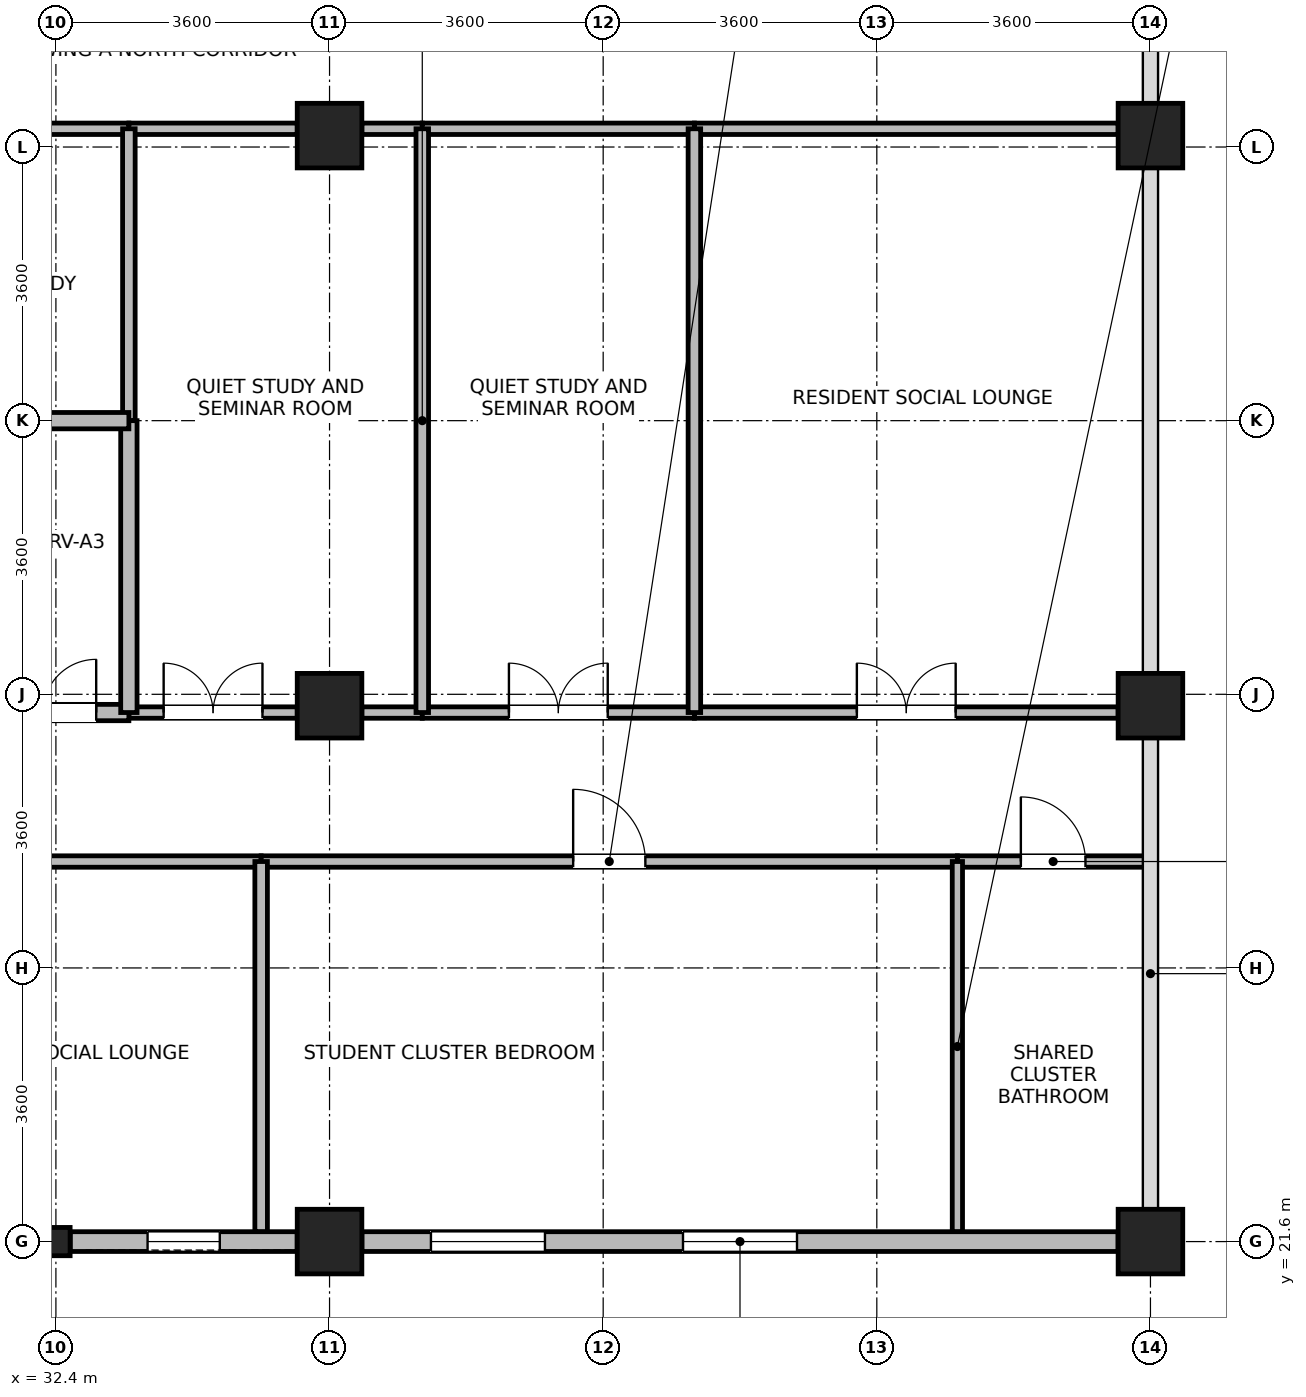
"""IFC4 building model, lengths in metres.
Left out: names, types, materials, properties, quantities, classifications, styles, units other than length and angle.
Written with IfcOpenShell. Run it as: python <this file> out.ifc"""

import sys

from ifc_helpers import new_model, si_unit, direction, frame, frame_2d, origin, origin_2d, place, context, subcontext, project, spatial, rectangle, i_section, extrude, source, transform, mapped, element, fill, save


model = new_model("IFC4")
c1 = context("Model", 3, precision=1e-05, world=origin(), true_north=direction((0.0, 1.0)))
c2 = subcontext(c1, "Body", "Model", "MODEL_VIEW")
j1 = project(units=[si_unit("LENGTHUNIT", "METRE"), si_unit("PLANEANGLEUNIT", "RADIAN")], contexts=[c1])
p1 = place(None, origin())
s1 = spatial("IfcSite", under=j1, at=p1, CompositionType="ELEMENT")
p2 = place(p1, origin())
s2 = spatial("IfcBuilding", under=s1, at=p2, CompositionType="ELEMENT")
p3 = place(p2, frame((0.0, 0.0, 279.5)))
s3 = spatial("IfcBuildingStorey", under=s2, at=p3, CompositionType="ELEMENT", Elevation=279.5)
m1 = source(origin(), c2, "Body", "SweptSolid", [
    extrude(rectangle(XDim=0.85, YDim=0.85, at=origin_2d()), origin(), (0.0, 0.0, 1.0), 3.7),
])
for number, where, z_axis, x_axis in (
    (1, (36.0, 21.6, 0.0), (0.0, 0.0, 1.0), (1.0, 0.0, 0.0)),
    (2, (36.0, 28.65, 0.0), (0.0, 0.0, 1.0), (1.0, 0.0, 0.0)),
    (3, (36.0, 36.15, 0.0), (0.0, 0.0, 1.0), (1.0, 0.0, 0.0)),
    (4, (46.8, 21.6, 0.0), (0.0, 0.0, 1.0), (1.0, 0.0, 0.0)),
    (5, (46.8, 28.65, 0.0), (0.0, 0.0, 1.0), (1.0, 0.0, 0.0)),
    (6, (46.8, 36.15, 0.0), (0.0, 0.0, 1.0), (1.0, 0.0, 0.0)),
):
    element("IfcColumn", number, at=place(p3, frame(where, z_axis=z_axis, x_axis=x_axis)), inside=s3, PredefinedType="COLUMN", context=c2, shape_type="MappedRepresentation", body=[
        mapped(m1, transform((0.0, 0.0, 0.0), x_axis=(1.0, 0.0, 0.0), y_axis=(0.0, 1.0, 0.0), z_axis=(0.0, 0.0, 1.0), scale=1.0)),
    ])
m2 = source(origin(), c2, "Body", "SweptSolid", [
    extrude(i_section(OverallWidth=0.374, OverallDepth=0.372, WebThickness=0.015, FlangeThickness=0.026, FilletRadius=0.015, at=origin_2d()), origin(), (0.0, 0.0, 1.0), 3.7),
])
p4 = place(p3, frame((32.4, 21.6, 0.0), z_axis=(0.0, 0.0, 1.0), x_axis=(1.0, 0.0, 0.0)))
e7 = element("IfcColumn", 7, at=p4, inside=s3, PredefinedType="COLUMN", context=c2, shape_type="MappedRepresentation", body=[
    mapped(m2, transform((0.0, 0.0, 0.0), x_axis=(1.0, 0.0, 0.0), y_axis=(0.0, 1.0, 0.0), z_axis=(0.0, 0.0, 1.0), scale=1.0)),
])
p5 = place(p3, frame((35.574, 21.6, 0.0), z_axis=(0.0, 0.0, 1.0), x_axis=(-1.0, 0.0, 0.0)))
e8 = element("IfcWall", 8, at=p5, inside=s3, PredefinedType="STANDARD", context=c2, shape_type="SweptSolid", body=[
    extrude(rectangle(XDim=2.986, YDim=0.26, at=frame_2d((1.493, 0.0))), origin(), (0.0, 0.0, 1.0), 3.055),
])
p6 = place(p5, frame((1.018, 0.0, 0.85)))
e9 = element("IfcOpeningElement", 9, at=p6, cuts=e8, PredefinedType="OPENING", context=c2, shape_type="SweptSolid", body=[
    extrude(rectangle(XDim=0.95, YDim=1.75, at=frame_2d((0.475, 0.875))), frame((0.0, 0.14, 0.0), z_axis=(0.0, -1.0, 0.0), x_axis=(1.0, 0.0, 0.0)), (0.0, 0.0, 1.0), 0.28),
])
p7 = place(p3, frame((46.374, 21.6, 0.0), z_axis=(0.0, 0.0, 1.0), x_axis=(-1.0, 0.0, 0.0)))
e10 = element("IfcWall", 10, at=p7, inside=s3, PredefinedType="STANDARD", context=c2, shape_type="SweptSolid", body=[
    extrude(rectangle(XDim=9.948, YDim=0.26, at=frame_2d((4.974, 0.0))), origin(), (0.0, 0.0, 1.0), 3.055),
])
p8 = place(p7, frame((4.224, 0.0, 0.85)))
e11 = element("IfcOpeningElement", 11, at=p8, cuts=e10, PredefinedType="OPENING", context=c2, shape_type="SweptSolid", body=[
    extrude(rectangle(XDim=1.5, YDim=1.85, at=frame_2d((0.75, 0.925))), frame((0.0, 0.14, 0.0), z_axis=(0.0, -1.0, 0.0), x_axis=(1.0, 0.0, 0.0)), (0.0, 0.0, 1.0), 0.28),
])
p9 = place(p7, frame((7.54, 0.0, 0.85)))
e12 = element("IfcOpeningElement", 12, at=p9, cuts=e10, PredefinedType="OPENING", context=c2, shape_type="SweptSolid", body=[
    extrude(rectangle(XDim=1.5, YDim=1.85, at=frame_2d((0.75, 0.925))), frame((0.0, 0.14, 0.0), z_axis=(0.0, -1.0, 0.0), x_axis=(1.0, 0.0, 0.0)), (0.0, 0.0, 1.0), 0.28),
])
p10 = place(p3, frame((16.2, 26.6, 0.0), z_axis=(0.0, 0.0, 1.0), x_axis=(1.0, 0.0, 0.0)))
e13 = element("IfcWall", 13, at=p10, inside=s3, PredefinedType="PARTITIONING", context=c2, shape_type="SweptSolid", body=[
    extrude(rectangle(XDim=18.9, YDim=0.15, at=frame_2d((9.45, 0.0))), origin(), (0.0, 0.0, 1.0), 3.455),
])
p11 = place(p10, frame((8.8, 0.0, 0.0)))
e14 = element("IfcOpeningElement", 14, at=p11, cuts=e13, PredefinedType="OPENING", context=c2, shape_type="SweptSolid", body=[
    extrude(rectangle(XDim=1.3, YDim=2.12, at=frame_2d((0.65, 1.06))), frame((0.0, 0.085, 0.0), z_axis=(0.0, -1.0, 0.0), x_axis=(1.0, 0.0, 0.0)), (0.0, 0.0, 1.0), 0.17),
])
p12 = place(p3, frame((35.1, 26.6, 0.0), z_axis=(0.0, 0.0, 1.0), x_axis=(1.0, 0.0, 0.0)))
e15 = element("IfcWall", 15, at=p12, inside=s3, PredefinedType="PARTITIONING", context=c2, shape_type="SweptSolid", body=[
    extrude(rectangle(XDim=9.16, YDim=0.15, at=frame_2d((4.58, 0.0))), origin(), (0.0, 0.0, 1.0), 3.455),
])
p13 = place(p12, frame((4.105, 0.0, 0.0)))
e16 = element("IfcOpeningElement", 16, at=p13, cuts=e15, PredefinedType="OPENING", context=c2, shape_type="SweptSolid", body=[
    extrude(rectangle(XDim=0.95, YDim=2.1, at=frame_2d((0.475, 1.05))), frame((0.0, 0.085, 0.0), z_axis=(0.0, -1.0, 0.0), x_axis=(1.0, 0.0, 0.0)), (0.0, 0.0, 1.0), 0.17),
])
p14 = place(p3, frame((40.8, 28.56, 0.0), z_axis=(0.0, 0.0, 1.0), x_axis=(1.0, 0.0, 0.0)))
e17 = element("IfcWall", 17, at=p14, inside=s3, PredefinedType="PARTITIONING", context=c2, shape_type="SweptSolid", body=[
    extrude(rectangle(XDim=5.575, YDim=0.15, at=frame_2d((2.788, 0.0))), origin(), (0.0, 0.0, 1.0), 2.905),
])
p15 = place(p14, frame((2.137, 0.0, 0.0)))
e18 = element("IfcOpeningElement", 18, at=p15, cuts=e17, PredefinedType="OPENING", context=c2, shape_type="SweptSolid", body=[
    extrude(rectangle(XDim=1.3, YDim=2.12, at=frame_2d((0.65, 1.06))), frame((0.0, 0.085, 0.0), z_axis=(0.0, -1.0, 0.0), x_axis=(1.0, 0.0, 0.0)), (0.0, 0.0, 1.0), 0.17),
])
p16 = place(p3, frame((40.8, 36.24, 0.0), z_axis=(0.0, 0.0, 1.0), x_axis=(1.0, 0.0, 0.0)))
e19 = element("IfcWall", 19, at=p16, inside=s3, PredefinedType="PARTITIONING", context=c2, shape_type="SweptSolid", body=[
    extrude(rectangle(XDim=5.575, YDim=0.15, at=frame_2d((2.788, 0.0))), origin(), (0.0, 0.0, 1.0), 2.905),
])
p17 = place(p3, frame((29.225, 36.24, 0.0), z_axis=(0.0, 0.0, 1.0), x_axis=(1.0, 0.0, 0.0)))
e20 = element("IfcWall", 20, at=p17, inside=s3, PredefinedType="PARTITIONING", context=c2, shape_type="SweptSolid", body=[
    extrude(rectangle(XDim=4.135, YDim=0.15, at=frame_2d((2.067, 0.0))), origin(), (0.0, 0.0, 1.0), 2.905),
])
p18 = place(p17, frame((1.417, 0.0, 0.0)))
e21 = element("IfcOpeningElement", 21, at=p18, cuts=e20, PredefinedType="OPENING", context=c2, shape_type="SweptSolid", body=[
    extrude(rectangle(XDim=1.3, YDim=2.12, at=frame_2d((0.65, 1.06))), frame((0.0, 0.085, 0.0), z_axis=(0.0, -1.0, 0.0), x_axis=(1.0, 0.0, 0.0)), (0.0, 0.0, 1.0), 0.17),
])
p19 = place(p3, frame((33.36, 28.56, 0.0), z_axis=(0.0, 0.0, 1.0), x_axis=(1.0, 0.0, 0.0)))
e22 = element("IfcWall", 22, at=p19, inside=s3, PredefinedType="PARTITIONING", context=c2, shape_type="SweptSolid", body=[
    extrude(rectangle(XDim=2.215, YDim=0.15, at=frame_2d((1.107, 0.0))), origin(), (0.0, 0.0, 1.0), 2.905),
])
p20 = place(p19, frame((0.458, 0.0, 0.0)))
e23 = element("IfcOpeningElement", 23, at=p20, cuts=e22, PredefinedType="OPENING", context=c2, shape_type="SweptSolid", body=[
    extrude(rectangle(XDim=1.3, YDim=2.12, at=frame_2d((0.65, 1.06))), frame((0.0, 0.085, 0.0), z_axis=(0.0, -1.0, 0.0), x_axis=(1.0, 0.0, 0.0)), (0.0, 0.0, 1.0), 0.17),
])
p21 = place(p3, frame((36.425, 28.56, 0.0), z_axis=(0.0, 0.0, 1.0), x_axis=(1.0, 0.0, 0.0)))
e24 = element("IfcWall", 24, at=p21, inside=s3, PredefinedType="PARTITIONING", context=c2, shape_type="SweptSolid", body=[
    extrude(rectangle(XDim=0.795, YDim=0.15, at=frame_2d((0.397, 0.0))), origin(), (0.0, 0.0, 1.0), 2.905),
])
p22 = place(p3, frame((33.36, 36.24, 0.0), z_axis=(0.0, 0.0, 1.0), x_axis=(1.0, 0.0, 0.0)))
e25 = element("IfcWall", 25, at=p22, inside=s3, PredefinedType="PARTITIONING", context=c2, shape_type="SweptSolid", body=[
    extrude(rectangle(XDim=2.215, YDim=0.15, at=frame_2d((1.107, 0.0))), origin(), (0.0, 0.0, 1.0), 2.905),
])
p23 = place(p3, frame((36.425, 36.24, 0.0), z_axis=(0.0, 0.0, 1.0), x_axis=(1.0, 0.0, 0.0)))
e26 = element("IfcWall", 26, at=p23, inside=s3, PredefinedType="PARTITIONING", context=c2, shape_type="SweptSolid", body=[
    extrude(rectangle(XDim=0.795, YDim=0.15, at=frame_2d((0.397, 0.0))), origin(), (0.0, 0.0, 1.0), 2.905),
])
p24 = place(p3, frame((37.22, 28.56, 0.0), z_axis=(0.0, 0.0, 1.0), x_axis=(1.0, 0.0, 0.0)))
e27 = element("IfcWall", 27, at=p24, inside=s3, PredefinedType="PARTITIONING", context=c2, shape_type="SweptSolid", body=[
    extrude(rectangle(XDim=3.58, YDim=0.15, at=frame_2d((1.79, 0.0))), origin(), (0.0, 0.0, 1.0), 2.905),
])
p25 = place(p24, frame((1.14, 0.0, 0.0)))
e28 = element("IfcOpeningElement", 28, at=p25, cuts=e27, PredefinedType="OPENING", context=c2, shape_type="SweptSolid", body=[
    extrude(rectangle(XDim=1.3, YDim=2.12, at=frame_2d((0.65, 1.06))), frame((0.0, 0.085, 0.0), z_axis=(0.0, -1.0, 0.0), x_axis=(1.0, 0.0, 0.0)), (0.0, 0.0, 1.0), 0.17),
])
p26 = place(p3, frame((37.22, 36.24, 0.0), z_axis=(0.0, 0.0, 1.0), x_axis=(1.0, 0.0, 0.0)))
e29 = element("IfcWall", 29, at=p26, inside=s3, PredefinedType="PARTITIONING", context=c2, shape_type="SweptSolid", body=[
    extrude(rectangle(XDim=3.58, YDim=0.15, at=frame_2d((1.79, 0.0))), origin(), (0.0, 0.0, 1.0), 2.905),
])
p27 = place(p3, frame((44.26, 26.6, 0.0), z_axis=(0.0, 0.0, 1.0), x_axis=(1.0, 0.0, 0.0)))
e30 = element("IfcWall", 30, at=p27, inside=s3, PredefinedType="PARTITIONING", context=c2, shape_type="SweptSolid", body=[
    extrude(rectangle(XDim=2.52, YDim=0.15, at=frame_2d((1.26, 0.0))), origin(), (0.0, 0.0, 1.0), 3.455),
])
p28 = place(p27, frame((0.835, 0.0, 0.0)))
e31 = element("IfcOpeningElement", 31, at=p28, cuts=e30, PredefinedType="OPENING", context=c2, shape_type="SweptSolid", body=[
    extrude(rectangle(XDim=0.85, YDim=2.04, at=frame_2d((0.425, 1.02))), frame((0.0, 0.085, 0.0), z_axis=(0.0, -1.0, 0.0), x_axis=(1.0, 0.0, 0.0)), (0.0, 0.0, 1.0), 0.17),
])
p29 = place(p3, frame((31.1, 28.56, 0.0), z_axis=(0.0, 0.0, 1.0), x_axis=(1.0, 0.0, 0.0)))
e32 = element("IfcWall", 32, at=p29, inside=s3, PredefinedType="PARTITIONING", context=c2, shape_type="SweptSolid", body=[
    extrude(rectangle(XDim=2.26, YDim=0.215, at=frame_2d((1.13, 0.0))), origin(), (0.0, 0.0, 1.0), 2.905),
])
p30 = place(p29, frame((0.43, 0.0, 0.0)))
e33 = element("IfcOpeningElement", 33, at=p30, cuts=e32, PredefinedType="OPENING", context=c2, shape_type="SweptSolid", body=[
    extrude(rectangle(XDim=1.4, YDim=2.15, at=frame_2d((0.7, 1.075))), frame((0.0, 0.118, 0.0), z_axis=(0.0, -1.0, 0.0), x_axis=(1.0, 0.0, 0.0)), (0.0, 0.0, 1.0), 0.235),
])
for number, where, z_axis, x_axis in (
    (34, (37.22, 28.56, 0.0), (0.0, 0.0, 1.0), (0.0, 1.0, 0.0)),
    (35, (40.8, 28.56, 0.0), (0.0, 0.0, 1.0), (0.0, 1.0, 0.0)),
):
    element("IfcWall", number, at=place(p3, frame(where, z_axis=z_axis, x_axis=x_axis)), inside=s3, PredefinedType="PARTITIONING", context=c2, shape_type="SweptSolid", body=[
        extrude(rectangle(XDim=7.68, YDim=0.165, at=frame_2d((3.84, 0.0))), origin(), (0.0, 0.0, 1.0), 3.455),
    ])
p31 = place(p3, frame((35.1, 21.732, 0.0), z_axis=(0.0, 0.0, 1.0), x_axis=(0.0, 1.0, 0.0)))
e36 = element("IfcWall", 36, at=p31, inside=s3, PredefinedType="PARTITIONING", context=c2, shape_type="SweptSolid", body=[
    extrude(rectangle(XDim=4.868, YDim=0.165, at=frame_2d((2.434, 0.0))), origin(), (0.0, 0.0, 1.0), 3.455),
])
p32 = place(p3, frame((44.26, 21.732, 0.0), z_axis=(0.0, 0.0, 1.0), x_axis=(0.0, 1.0, 0.0)))
e37 = element("IfcWall", 37, at=p32, inside=s3, PredefinedType="PARTITIONING", context=c2, shape_type="SweptSolid", body=[
    extrude(rectangle(XDim=4.868, YDim=0.135, at=frame_2d((2.434, 0.0))), origin(), (0.0, 0.0, 1.0), 3.455),
])
p33 = place(p3, frame((33.36, 32.4, 0.0), z_axis=(0.0, 0.0, 1.0), x_axis=(0.0, 1.0, 0.0)))
e38 = element("IfcWall", 38, at=p33, inside=s3, PredefinedType="PARTITIONING", context=c2, shape_type="SweptSolid", body=[
    extrude(rectangle(XDim=3.84, YDim=0.165, at=frame_2d((1.92, 0.0))), origin(), (0.0, 0.0, 1.0), 3.455),
])
p34 = place(p3, frame((33.36, 28.56, 0.0), z_axis=(0.0, 0.0, 1.0), x_axis=(0.0, 1.0, 0.0)))
e39 = element("IfcWall", 39, at=p34, inside=s3, PredefinedType="PARTITIONING", context=c2, shape_type="SweptSolid", body=[
    extrude(rectangle(XDim=3.84, YDim=0.215, at=frame_2d((1.92, 0.0))), origin(), (0.0, 0.0, 1.0), 3.455),
])
p35 = place(p3, frame((31.1, 32.4, 0.0), z_axis=(0.0, 0.0, 1.0), x_axis=(1.0, 0.0, 0.0)))
e40 = element("IfcWall", 40, at=p35, inside=s3, PredefinedType="PARTITIONING", context=c2, shape_type="SweptSolid", body=[
    extrude(rectangle(XDim=2.26, YDim=0.215, at=frame_2d((1.13, 0.0))), origin(), (0.0, 0.0, 1.0), 3.455),
])
p36 = place(p6, origin())
e41 = element("IfcWindow", 41, at=p36, inside=s3, PartitioningType="SINGLE_PANEL", PredefinedType="WINDOW", context=c2, shape_type="SweptSolid", body=[
    extrude(rectangle(XDim=0.95, YDim=1.75, at=frame_2d((0.475, 0.875))), frame((0.0, 0.03, 0.0), z_axis=(0.0, -1.0, 0.0), x_axis=(1.0, 0.0, 0.0)), (0.0, 0.0, 1.0), 0.06),
])
fill(e9, e41)
p37 = place(p8, origin())
e42 = element("IfcWindow", 42, at=p37, inside=s3, PartitioningType="SINGLE_PANEL", PredefinedType="WINDOW", context=c2, shape_type="SweptSolid", body=[
    extrude(rectangle(XDim=1.5, YDim=1.85, at=frame_2d((0.75, 0.925))), frame((0.0, 0.03, 0.0), z_axis=(0.0, -1.0, 0.0), x_axis=(1.0, 0.0, 0.0)), (0.0, 0.0, 1.0), 0.06),
])
fill(e11, e42)
p38 = place(p9, origin())
e43 = element("IfcWindow", 43, at=p38, inside=s3, PartitioningType="SINGLE_PANEL", PredefinedType="WINDOW", context=c2, shape_type="SweptSolid", body=[
    extrude(rectangle(XDim=1.5, YDim=1.85, at=frame_2d((0.75, 0.925))), frame((0.0, 0.03, 0.0), z_axis=(0.0, -1.0, 0.0), x_axis=(1.0, 0.0, 0.0)), (0.0, 0.0, 1.0), 0.06),
])
fill(e12, e43)
p39 = place(p13, origin())
e44 = element("IfcDoor", 44, at=p39, inside=s3, OperationType="SINGLE_SWING_LEFT", PredefinedType="DOOR", context=c2, shape_type="SweptSolid", body=[
    extrude(rectangle(XDim=0.95, YDim=2.1, at=frame_2d((0.475, 1.05))), frame((0.0, 0.025, 0.0), z_axis=(0.0, -1.0, 0.0), x_axis=(1.0, 0.0, 0.0)), (0.0, 0.0, 1.0), 0.05),
])
fill(e16, e44)
p40 = place(p15, origin())
e45 = element("IfcDoor", 45, at=p40, inside=s3, OperationType="DOUBLE_DOOR_SINGLE_SWING", PredefinedType="DOOR", context=c2, shape_type="SweptSolid", body=[
    extrude(rectangle(XDim=1.3, YDim=2.12, at=frame_2d((0.65, 1.06))), frame((0.0, 0.025, 0.0), z_axis=(0.0, -1.0, 0.0), x_axis=(1.0, 0.0, 0.0)), (0.0, 0.0, 1.0), 0.05),
])
fill(e18, e45)
p41 = place(p20, origin())
e46 = element("IfcDoor", 46, at=p41, inside=s3, OperationType="DOUBLE_DOOR_SINGLE_SWING", PredefinedType="DOOR", context=c2, shape_type="SweptSolid", body=[
    extrude(rectangle(XDim=1.3, YDim=2.12, at=frame_2d((0.65, 1.06))), frame((0.0, 0.025, 0.0), z_axis=(0.0, -1.0, 0.0), x_axis=(1.0, 0.0, 0.0)), (0.0, 0.0, 1.0), 0.05),
])
fill(e23, e46)
p42 = place(p25, origin())
e47 = element("IfcDoor", 47, at=p42, inside=s3, OperationType="DOUBLE_DOOR_SINGLE_SWING", PredefinedType="DOOR", context=c2, shape_type="SweptSolid", body=[
    extrude(rectangle(XDim=1.3, YDim=2.12, at=frame_2d((0.65, 1.06))), frame((0.0, 0.025, 0.0), z_axis=(0.0, -1.0, 0.0), x_axis=(1.0, 0.0, 0.0)), (0.0, 0.0, 1.0), 0.05),
])
fill(e28, e47)
p43 = place(p28, origin())
e48 = element("IfcDoor", 48, at=p43, inside=s3, OperationType="SINGLE_SWING_LEFT", PredefinedType="DOOR", context=c2, shape_type="SweptSolid", body=[
    extrude(rectangle(XDim=0.85, YDim=2.04, at=frame_2d((0.425, 1.02))), frame((0.0, 0.025, 0.0), z_axis=(0.0, -1.0, 0.0), x_axis=(1.0, 0.0, 0.0)), (0.0, 0.0, 1.0), 0.05),
])
fill(e31, e48)
p44 = place(p30, origin())
e49 = element("IfcDoor", 49, at=p44, inside=s3, OperationType="DOUBLE_DOOR_SINGLE_SWING", PredefinedType="DOOR", context=c2, shape_type="SweptSolid", body=[
    extrude(rectangle(XDim=1.4, YDim=2.15, at=frame_2d((0.7, 1.075))), frame((0.0, 0.025, 0.0), z_axis=(0.0, -1.0, 0.0), x_axis=(1.0, 0.0, 0.0)), (0.0, 0.0, 1.0), 0.05),
])
fill(e33, e49)
save(model, sys.argv[1])
